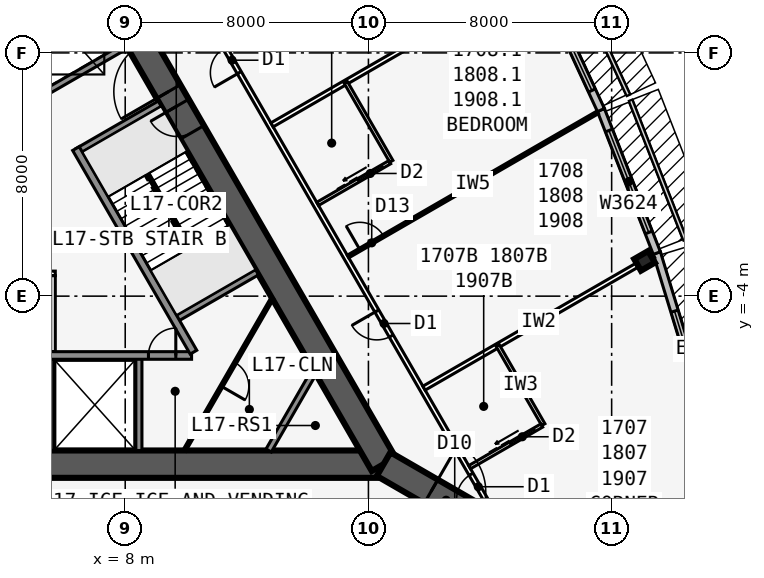
"""IFC4 building model, lengths in metres.
Left out: names, types, materials, properties, quantities, classifications, styles, units other than length and angle.
Written with IfcOpenShell. Run it as: python <this file> out.ifc"""

import sys

from ifc_helpers import new_model, si_unit, direction, frame, frame_2d, origin, origin_2d, place, context, subcontext, project, spatial, rectangle, i_section, extrude, element, fill, save


model = new_model("IFC4")
c1 = context("Model", 3, precision=1e-05, world=origin(), true_north=direction((0.0, 1.0)))
c2 = subcontext(c1, "Body", "Model", "MODEL_VIEW")
j1 = project(units=[si_unit("LENGTHUNIT", "METRE"), si_unit("PLANEANGLEUNIT", "RADIAN")], contexts=[c1])
p1 = place(None, origin())
s1 = spatial("IfcSite", under=j1, at=p1, CompositionType="ELEMENT")
p2 = place(p1, origin())
s2 = spatial("IfcBuilding", under=s1, at=p2, CompositionType="ELEMENT")
p3 = place(p2, frame((0.0, 0.0, 69.3)))
s3 = spatial("IfcBuildingStorey", under=s2, at=p3, CompositionType="ELEMENT", Elevation=69.3)
p4 = place(p3, frame((-16.5, -9.526, 0.0), z_axis=(0.0, 0.0, 1.0), x_axis=(1.0, 0.0, 0.0)))
e1 = element("IfcWall", 1, at=p4, inside=s3, PredefinedType="SHEAR", context=c2, shape_type="SweptSolid", body=[
    extrude(rectangle(XDim=33.0, YDim=0.9, at=frame_2d((16.5, 0.0))), origin(), (0.0, 0.0, 1.0), 3.4),
])
p5 = place(p4, frame((14.05, 0.0, 0.0)))
e2 = element("IfcOpeningElement", 2, at=p5, cuts=e1, PredefinedType="OPENING", context=c2, shape_type="SweptSolid", body=[
    extrude(rectangle(XDim=1.8, YDim=2.13, at=frame_2d((0.9, 1.065))), frame((0.0, 0.46, 0.0), z_axis=(0.0, -1.0, 0.0), x_axis=(1.0, 0.0, 0.0)), (0.0, 0.0, 1.0), 0.92),
])
p6 = place(p3, frame((-0.55, -5.951, 0.0), z_axis=(0.0, 0.0, 1.0), x_axis=(1.0, 0.0, 0.0)))
e3 = element("IfcWall", 3, at=p6, inside=s3, PredefinedType="SOLIDWALL", context=c2, shape_type="SweptSolid", body=[
    extrude(rectangle(XDim=10.733, YDim=0.25, at=frame_2d((5.366, 0.0))), origin(), (0.0, 0.0, 1.0), 3.235),
])
p7 = place(p6, frame((9.314, 0.0, 0.0)))
e4 = element("IfcOpeningElement", 4, at=p7, cuts=e3, PredefinedType="OPENING", context=c2, shape_type="SweptSolid", body=[
    extrude(rectangle(XDim=0.9, YDim=2.13, at=frame_2d((0.45, 1.065))), frame((0.0, 0.135, 0.0), z_axis=(0.0, -1.0, 0.0), x_axis=(1.0, 0.0, 0.0)), (0.0, 0.0, 1.0), 0.27),
])
p8 = place(p6, frame((1.05, 0.0, 0.0)))
e5 = element("IfcOpeningElement", 5, at=p8, cuts=e3, PredefinedType="OPENING", context=c2, shape_type="SweptSolid", body=[
    extrude(rectangle(XDim=1.1, YDim=2.13, at=frame_2d((0.55, 1.065))), frame((0.0, 0.135, 0.0), z_axis=(0.0, -1.0, 0.0), x_axis=(1.0, 0.0, 0.0)), (0.0, 0.0, 1.0), 0.27),
])
p9 = place(p6, frame((4.05, 0.0, 0.0)))
e6 = element("IfcOpeningElement", 6, at=p9, cuts=e3, PredefinedType="OPENING", context=c2, shape_type="SweptSolid", body=[
    extrude(rectangle(XDim=1.1, YDim=2.13, at=frame_2d((0.55, 1.065))), frame((0.0, 0.135, 0.0), z_axis=(0.0, -1.0, 0.0), x_axis=(1.0, 0.0, 0.0)), (0.0, 0.0, 1.0), 0.27),
])
for number, where, z_axis, x_axis in (
    (7, (5.55, -5.951, 0.0), (0.0, 0.0, 1.0), (0.0, -1.0, 0.0)),
    (8, (8.45, -5.951, 0.0), (0.0, 0.0, 1.0), (0.0, -1.0, 0.0)),
):
    element("IfcWall", number, at=place(p3, frame(where, z_axis=z_axis, x_axis=x_axis)), inside=s3, PredefinedType="SOLIDWALL", context=c2, shape_type="SweptSolid", body=[
        extrude(rectangle(XDim=3.125, YDim=0.2, at=frame_2d((1.562, 0.0))), origin(), (0.0, 0.0, 1.0), 3.235),
    ])
p10 = place(p3, frame((16.5, -9.526, 0.0), z_axis=(0.0, 0.0, 1.0), x_axis=(-0.499999749417, 0.866025548458, 0.0)))
e9 = element("IfcWall", 9, at=p10, inside=s3, PredefinedType="SHEAR", context=c2, shape_type="SweptSolid", body=[
    extrude(rectangle(XDim=33.0, YDim=0.9, at=frame_2d((16.5, 0.0))), origin(), (0.0, 0.0, 1.0), 3.4),
])
p11 = place(p10, frame((14.15, 0.0, 0.0)))
e10 = element("IfcOpeningElement", 10, at=p11, cuts=e9, PredefinedType="OPENING", context=c2, shape_type="SweptSolid", body=[
    extrude(rectangle(XDim=1.8, YDim=2.13, at=frame_2d((0.9, 1.065))), frame((0.0, 0.46, 0.0), z_axis=(0.0, -1.0, 0.0), x_axis=(1.0, 0.0, 0.0)), (0.0, 0.0, 1.0), 0.92),
])
p12 = place(p10, frame((12.6, 0.0, 0.0)))
e11 = element("IfcOpeningElement", 11, at=p12, cuts=e9, PredefinedType="OPENING", context=c2, shape_type="SweptSolid", body=[
    extrude(rectangle(XDim=1.0, YDim=2.13, at=frame_2d((0.5, 1.065))), frame((0.0, 0.46, 0.0), z_axis=(0.0, -1.0, 0.0), x_axis=(1.0, 0.0, 0.0)), (0.0, 0.0, 1.0), 0.92),
])
p13 = place(p3, frame((10.245, -5.843, 0.0), z_axis=(0.0, 0.0, 1.0), x_axis=(-0.499993009313, 0.866029439822, 0.0)))
e12 = element("IfcWall", 12, at=p13, inside=s3, PredefinedType="SOLIDWALL", context=c2, shape_type="SweptSolid", body=[
    extrude(rectangle(XDim=7.733, YDim=0.25, at=frame_2d((3.866, 0.0))), origin(), (0.0, 0.0, 1.0), 3.235),
])
for number, where, z_axis, x_axis in (
    (13, (9.629, -4.775, 0.0), (0.0, 0.0, 1.0), (0.866, 0.5, 0.0)),
    (14, (6.429, 0.767, 0.0), (0.0, 0.0, 1.0), (0.866, 0.5, 0.0)),
    (15, (5.329, 2.673, 0.0), (0.0, 0.0, 1.0), (0.866, 0.5, 0.0)),
):
    element("IfcWall", number, at=place(p3, frame(where, z_axis=z_axis, x_axis=x_axis)), inside=s3, PredefinedType="SOLIDWALL", context=c2, shape_type="SweptSolid", body=[
        extrude(rectangle(XDim=3.125, YDim=0.2, at=frame_2d((1.562, 0.0))), origin(), (0.0, 0.0, 1.0), 3.235),
    ])
p14 = place(p3, frame((16.5, -9.526, 0.0), z_axis=(0.0, 0.0, 1.0), x_axis=(0.866031398331, -0.499989616998, 0.0)))
e16 = element("IfcWall", 16, at=p14, inside=s3, PredefinedType="SHEAR", context=c2, shape_type="SweptSolid", body=[
    extrude(rectangle(XDim=4.746, YDim=0.9, at=frame_2d((2.373, 0.0))), origin(), (0.0, 0.0, 1.0), 3.4),
])
p15 = place(p14, frame((1.8, 0.0, 0.0)))
e17 = element("IfcOpeningElement", 17, at=p15, cuts=e16, PredefinedType="OPENING", context=c2, shape_type="SweptSolid", body=[
    extrude(rectangle(XDim=1.8, YDim=2.13, at=frame_2d((0.9, 1.065))), frame((0.0, 0.46, 0.0), z_axis=(0.0, -1.0, 0.0), x_axis=(1.0, 0.0, 0.0)), (0.0, 0.0, 1.0), 0.92),
])
p16 = place(p3, frame((25.083, -2.839, 0.0), z_axis=(0.0, 0.0, 1.0), x_axis=(-0.5, 0.866025403784, 0.0)))
e18 = element("IfcColumn", 18, at=p16, inside=s3, PredefinedType="COLUMN", context=c2, shape_type="SweptSolid", body=[
    extrude(i_section(OverallWidth=0.442, OverallDepth=0.531, WebThickness=0.066, FlangeThickness=0.106, at=origin_2d()), origin(), (0.0, 0.0, 1.0), 3.4),
])
p17 = place(p3, frame((27.88, -10.429, 0.0), z_axis=(0.0, 0.0, 1.0), x_axis=(-0.2919790669, 0.956424709265, 0.0)))
e19 = element("IfcWall", 19, at=p17, inside=s3, PredefinedType="STANDARD", context=c2, shape_type="SweptSolid", body=[
    extrude(rectangle(XDim=8.211, YDim=0.25, at=frame_2d((4.105, 0.0))), origin(), (0.0, 0.0, 1.0), 3.235),
])
p18 = place(p17, frame((2.006, 0.0, 0.45)))
e20 = element("IfcOpeningElement", 20, at=p18, cuts=e19, PredefinedType="OPENING", context=c2, shape_type="SweptSolid", body=[
    extrude(rectangle(XDim=4.2, YDim=2.4, at=frame_2d((2.1, 1.2))), frame((0.0, 0.135, 0.0), z_axis=(0.0, -1.0, 0.0), x_axis=(1.0, 0.0, 0.0)), (0.0, 0.0, 1.0), 0.27),
])
p19 = place(p3, frame((25.486, -2.584, 0.0), z_axis=(0.0, 0.0, 1.0), x_axis=(-0.364013463868, 0.931393685894, 0.0)))
e21 = element("IfcWall", 21, at=p19, inside=s3, PredefinedType="STANDARD", context=c2, shape_type="SweptSolid", body=[
    extrude(rectangle(XDim=5.058, YDim=0.25, at=frame_2d((2.529, 0.0))), origin(), (0.0, 0.0, 1.0), 3.235),
])
p20 = place(p19, frame((0.729, 0.0, 0.45)))
e22 = element("IfcOpeningElement", 22, at=p20, cuts=e21, PredefinedType="OPENING", context=c2, shape_type="SweptSolid", body=[
    extrude(rectangle(XDim=3.6, YDim=2.4, at=frame_2d((1.8, 1.2))), frame((0.0, 0.135, 0.0), z_axis=(0.0, -1.0, 0.0), x_axis=(1.0, 0.0, 0.0)), (0.0, 0.0, 1.0), 0.27),
])
p21 = place(p3, frame((23.648, 2.119, 0.0), z_axis=(0.0, 0.0, 1.0), x_axis=(-0.419203100754, 0.907892482796, 0.0)))
e23 = element("IfcWall", 23, at=p21, inside=s3, PredefinedType="STANDARD", context=c2, shape_type="SweptSolid", body=[
    extrude(rectangle(XDim=5.021, YDim=0.25, at=frame_2d((2.51, 0.0))), origin(), (0.0, 0.0, 1.0), 3.235),
])
p22 = place(p21, frame((0.71, 0.0, 0.45)))
e24 = element("IfcOpeningElement", 24, at=p22, cuts=e23, PredefinedType="OPENING", context=c2, shape_type="SweptSolid", body=[
    extrude(rectangle(XDim=3.6, YDim=2.4, at=frame_2d((1.8, 1.2))), frame((0.0, 0.135, 0.0), z_axis=(0.0, -1.0, 0.0), x_axis=(1.0, 0.0, 0.0)), (0.0, 0.0, 1.0), 0.27),
])
p23 = place(p3, frame((20.027, -10.985, 0.0), z_axis=(0.0, 0.0, 1.0), x_axis=(-0.500001677587, 0.866024435227, 0.0)))
e25 = element("IfcWall", 25, at=p23, inside=s3, PredefinedType="PARTITIONING", context=c2, shape_type="SweptSolid", body=[
    extrude(rectangle(XDim=39.054, YDim=0.15, at=frame_2d((19.527, 0.0))), origin(), (0.0, 0.0, 1.0), 3.235),
])
p24 = place(p23, frame((0.352, 0.0, 0.0)))
e26 = element("IfcOpeningElement", 26, at=p24, cuts=e25, PredefinedType="OPENING", context=c2, shape_type="SweptSolid", body=[
    extrude(rectangle(XDim=0.95, YDim=2.13, at=frame_2d((0.475, 1.065))), frame((0.0, 0.085, 0.0), z_axis=(0.0, -1.0, 0.0), x_axis=(1.0, 0.0, 0.0)), (0.0, 0.0, 1.0), 0.17),
])
p25 = place(p23, frame((6.552, 0.0, 0.0)))
e27 = element("IfcOpeningElement", 27, at=p25, cuts=e25, PredefinedType="OPENING", context=c2, shape_type="SweptSolid", body=[
    extrude(rectangle(XDim=0.95, YDim=2.13, at=frame_2d((0.475, 1.065))), frame((0.0, 0.085, 0.0), z_axis=(0.0, -1.0, 0.0), x_axis=(1.0, 0.0, 0.0)), (0.0, 0.0, 1.0), 0.17),
])
p26 = place(p23, frame((16.552, 0.0, 0.0)))
e28 = element("IfcOpeningElement", 28, at=p26, cuts=e25, PredefinedType="OPENING", context=c2, shape_type="SweptSolid", body=[
    extrude(rectangle(XDim=0.95, YDim=2.13, at=frame_2d((0.475, 1.065))), frame((0.0, 0.085, 0.0), z_axis=(0.0, -1.0, 0.0), x_axis=(1.0, 0.0, 0.0)), (0.0, 0.0, 1.0), 0.17),
])
p27 = place(p23, frame((25.952, 0.0, 0.0)))
e29 = element("IfcOpeningElement", 29, at=p27, cuts=e25, PredefinedType="OPENING", context=c2, shape_type="SweptSolid", body=[
    extrude(rectangle(XDim=0.95, YDim=2.13, at=frame_2d((0.475, 1.065))), frame((0.0, 0.085, 0.0), z_axis=(0.0, -1.0, 0.0), x_axis=(1.0, 0.0, 0.0)), (0.0, 0.0, 1.0), 0.17),
])
p28 = place(p23, frame((36.546, 0.0, 0.0)))
e30 = element("IfcOpeningElement", 30, at=p28, cuts=e25, PredefinedType="OPENING", context=c2, shape_type="SweptSolid", body=[
    extrude(rectangle(XDim=0.95, YDim=2.13, at=frame_2d((0.475, 1.065))), frame((0.0, 0.085, 0.0), z_axis=(0.0, -1.0, 0.0), x_axis=(1.0, 0.0, 0.0)), (0.0, 0.0, 1.0), 0.17),
])
p29 = place(p3, frame((17.829, -7.027, 0.0), z_axis=(0.0, 0.0, 1.0), x_axis=(0.866032659912, 0.499987431809, 0.0)))
e31 = element("IfcWall", 31, at=p29, inside=s3, PredefinedType="PARTITIONING", context=c2, shape_type="SweptSolid", body=[
    extrude(rectangle(XDim=8.72, YDim=0.15, at=frame_2d((4.36, 0.0))), origin(), (0.0, 0.0, 1.0), 2.389),
])
p30 = place(p3, frame((15.329, -2.697, 0.0), z_axis=(0.0, 0.0, 1.0), x_axis=(0.866018409083, 0.500012114982, 0.0)))
e32 = element("IfcWall", 32, at=p30, inside=s3, PredefinedType="PARTITIONING", context=c2, shape_type="SweptSolid", body=[
    extrude(rectangle(XDim=9.485, YDim=0.1, at=frame_2d((4.742, 0.0))), origin(), (0.0, 0.0, 1.0), 2.389),
])
p31 = place(p30, frame((0.45, 0.0, 0.0)))
e33 = element("IfcOpeningElement", 33, at=p31, cuts=e32, PredefinedType="OPENING", context=c2, shape_type="SweptSolid", body=[
    extrude(rectangle(XDim=0.9, YDim=2.13, at=frame_2d((0.45, 1.065))), frame((0.0, 0.06, 0.0), z_axis=(0.0, -1.0, 0.0), x_axis=(1.0, 0.0, 0.0)), (0.0, 0.0, 1.0), 0.12),
])
p32 = place(p3, frame((12.829, 1.633, 0.0), z_axis=(0.0, 0.0, 1.0), x_axis=(0.866026934769, 0.499997348248, 0.0)))
e34 = element("IfcWall", 34, at=p32, inside=s3, PredefinedType="PARTITIONING", context=c2, shape_type="SweptSolid", body=[
    extrude(rectangle(XDim=9.943, YDim=0.15, at=frame_2d((4.971, 0.0))), origin(), (0.0, 0.0, 1.0), 2.389),
])
p33 = place(p3, frame((21.753, -8.225, 0.0), z_axis=(0.0, 0.0, 1.0), x_axis=(-0.499990139034, 0.866031096941, 0.0)))
e35 = element("IfcWall", 35, at=p33, inside=s3, PredefinedType="PLUMBINGWALL", context=c2, shape_type="SweptSolid", body=[
    extrude(rectangle(XDim=3.0, YDim=0.12, at=frame_2d((1.5, 0.0))), origin(), (0.0, 0.0, 1.0), 3.235),
])
p34 = place(p3, frame((19.329, -9.625, 0.0), z_axis=(0.0, 0.0, 1.0), x_axis=(0.866035715982, 0.499982138324, 0.0)))
e36 = element("IfcWall", 36, at=p34, inside=s3, PredefinedType="PLUMBINGWALL", context=c2, shape_type="SweptSolid", body=[
    extrude(rectangle(XDim=2.74, YDim=0.12, at=frame_2d((1.37, 0.0))), origin(), (0.0, 0.0, 1.0), 3.235),
])
p35 = place(p34, frame((1.55, 0.0, 0.0)))
e37 = element("IfcOpeningElement", 37, at=p35, cuts=e36, PredefinedType="OPENING", context=c2, shape_type="SweptSolid", body=[
    extrude(rectangle(XDim=0.9, YDim=2.13, at=frame_2d((0.45, 1.065))), frame((0.0, 0.07, 0.0), z_axis=(0.0, -1.0, 0.0), x_axis=(1.0, 0.0, 0.0)), (0.0, 0.0, 1.0), 0.14),
])
p36 = place(p3, frame((16.753, 0.435, 0.0), z_axis=(0.0, 0.0, 1.0), x_axis=(-0.499990139034, 0.866031096941, 0.0)))
e38 = element("IfcWall", 38, at=p36, inside=s3, PredefinedType="PLUMBINGWALL", context=c2, shape_type="SweptSolid", body=[
    extrude(rectangle(XDim=3.0, YDim=0.12, at=frame_2d((1.5, 0.0))), origin(), (0.0, 0.0, 1.0), 3.235),
])
p37 = place(p3, frame((14.329, -0.965, 0.0), z_axis=(0.0, 0.0, 1.0), x_axis=(0.866035715982, 0.499982138324, 0.0)))
e39 = element("IfcWall", 39, at=p37, inside=s3, PredefinedType="PLUMBINGWALL", context=c2, shape_type="SweptSolid", body=[
    extrude(rectangle(XDim=2.74, YDim=0.12, at=frame_2d((1.37, 0.0))), origin(), (0.0, 0.0, 1.0), 3.235),
])
p38 = place(p37, frame((1.55, 0.0, 0.0)))
e40 = element("IfcOpeningElement", 40, at=p38, cuts=e39, PredefinedType="OPENING", context=c2, shape_type="SweptSolid", body=[
    extrude(rectangle(XDim=0.9, YDim=2.13, at=frame_2d((0.45, 1.065))), frame((0.0, 0.07, 0.0), z_axis=(0.0, -1.0, 0.0), x_axis=(1.0, 0.0, 0.0)), (0.0, 0.0, 1.0), 0.14),
])
p39 = place(p3, frame((-2.65, -3.251, 0.0), z_axis=(0.0, 0.0, 1.0), x_axis=(1.0, 0.0, 0.0)))
e41 = element("IfcWall", 41, at=p39, inside=s3, PredefinedType="PARTITIONING", context=c2, shape_type="SweptSolid", body=[
    extrude(rectangle(XDim=8.35, YDim=0.15, at=frame_2d((4.175, 0.0))), origin(), (0.0, 0.0, 1.0), 3.235),
])
p40 = place(p3, frame((5.625, -5.826, 0.0), z_axis=(0.0, 0.0, 1.0), x_axis=(0.0, 1.0, 0.0)))
e42 = element("IfcWall", 42, at=p40, inside=s3, PredefinedType="PARTITIONING", context=c2, shape_type="SweptSolid", body=[
    extrude(rectangle(XDim=2.5, YDim=0.15, at=frame_2d((1.25, 0.0))), origin(), (0.0, 0.0, 1.0), 3.235),
])
p41 = place(p3, frame((14.219, -6.476, 0.0), z_axis=(0.0, 0.0, 1.0), x_axis=(-0.499952404951, -0.866052881055, 0.0)))
e43 = element("IfcWall", 43, at=p41, inside=s3, PredefinedType="SOLIDWALL", context=c2, shape_type="SweptSolid", body=[
    extrude(rectangle(XDim=3.002, YDim=0.2, at=frame_2d((1.501, 0.0))), origin(), (0.0, 0.0, 1.0), 3.235),
])
p42 = place(p3, frame((12.834, -4.076, 0.0), z_axis=(0.0, 0.0, 1.0), x_axis=(-0.500027479704, -0.866009537788, 0.0)))
e44 = element("IfcWall", 44, at=p42, inside=s3, PredefinedType="PARTITIONING", context=c2, shape_type="SweptSolid", body=[
    extrude(rectangle(XDim=5.774, YDim=0.1, at=frame_2d((2.887, 0.0))), origin(), (0.0, 0.0, 1.0), 3.235),
])
p43 = place(p42, frame((2.437, 0.0, 0.0)))
e45 = element("IfcOpeningElement", 45, at=p43, cuts=e44, PredefinedType="OPENING", context=c2, shape_type="SweptSolid", body=[
    extrude(rectangle(XDim=0.9, YDim=2.13, at=frame_2d((0.45, 1.065))), frame((0.0, 0.06, 0.0), z_axis=(0.0, -1.0, 0.0), x_axis=(1.0, 0.0, 0.0)), (0.0, 0.0, 1.0), 0.12),
])
p44 = place(p3, frame((10.135, -2.401, 0.0), z_axis=(0.0, 0.0, 1.0), x_axis=(-0.499992232847, 0.866029888106, 0.0)))
e46 = element("IfcWall", 46, at=p44, inside=s3, PredefinedType="SOLIDWALL", context=c2, shape_type="SweptSolid", body=[
    extrude(rectangle(XDim=2.794, YDim=0.1, at=frame_2d((1.397, 0.0))), origin(), (0.0, 0.0, 1.0), 3.4),
])
p45 = place(p18, origin())
e47 = element("IfcWindow", 47, at=p45, inside=s3, PartitioningType="SINGLE_PANEL", PredefinedType="WINDOW", context=c2, shape_type="SweptSolid", body=[
    extrude(rectangle(XDim=4.2, YDim=2.4, at=frame_2d((2.1, 1.2))), frame((0.0, 0.03, 0.0), z_axis=(0.0, -1.0, 0.0), x_axis=(1.0, 0.0, 0.0)), (0.0, 0.0, 1.0), 0.06),
])
fill(e20, e47)
p46 = place(p20, origin())
e48 = element("IfcWindow", 48, at=p46, inside=s3, PartitioningType="SINGLE_PANEL", PredefinedType="WINDOW", context=c2, shape_type="SweptSolid", body=[
    extrude(rectangle(XDim=3.6, YDim=2.4, at=frame_2d((1.8, 1.2))), frame((0.0, 0.03, 0.0), z_axis=(0.0, -1.0, 0.0), x_axis=(1.0, 0.0, 0.0)), (0.0, 0.0, 1.0), 0.06),
])
fill(e22, e48)
p47 = place(p22, origin())
e49 = element("IfcWindow", 49, at=p47, inside=s3, PartitioningType="SINGLE_PANEL", PredefinedType="WINDOW", context=c2, shape_type="SweptSolid", body=[
    extrude(rectangle(XDim=3.6, YDim=2.4, at=frame_2d((1.8, 1.2))), frame((0.0, 0.03, 0.0), z_axis=(0.0, -1.0, 0.0), x_axis=(1.0, 0.0, 0.0)), (0.0, 0.0, 1.0), 0.06),
])
fill(e24, e49)
p48 = place(p31, origin())
e50 = element("IfcDoor", 50, at=p48, inside=s3, OperationType="SINGLE_SWING_LEFT", PredefinedType="DOOR", context=c2, shape_type="SweptSolid", body=[
    extrude(rectangle(XDim=0.9, YDim=2.13, at=frame_2d((0.45, 1.065))), frame((0.0, 0.025, 0.0), z_axis=(0.0, -1.0, 0.0), x_axis=(1.0, 0.0, 0.0)), (0.0, 0.0, 1.0), 0.05),
])
fill(e33, e50)
p49 = place(p35, origin())
e51 = element("IfcDoor", 51, at=p49, inside=s3, OperationType="SLIDING_TO_LEFT", PredefinedType="DOOR", context=c2, shape_type="SweptSolid", body=[
    extrude(rectangle(XDim=0.9, YDim=2.13, at=frame_2d((0.45, 1.065))), frame((0.0, 0.025, 0.0), z_axis=(0.0, -1.0, 0.0), x_axis=(1.0, 0.0, 0.0)), (0.0, 0.0, 1.0), 0.05),
])
fill(e37, e51)
p50 = place(p24, origin())
e52 = element("IfcDoor", 52, at=p50, inside=s3, OperationType="SINGLE_SWING_LEFT", PredefinedType="DOOR", context=c2, shape_type="SweptSolid", body=[
    extrude(rectangle(XDim=0.95, YDim=2.13, at=frame_2d((0.475, 1.065))), frame((0.0, 0.025, 0.0), z_axis=(0.0, -1.0, 0.0), x_axis=(1.0, 0.0, 0.0)), (0.0, 0.0, 1.0), 0.05),
])
fill(e26, e52)
p51 = place(p25, origin())
e53 = element("IfcDoor", 53, at=p51, inside=s3, OperationType="SINGLE_SWING_RIGHT", PredefinedType="DOOR", context=c2, shape_type="SweptSolid", body=[
    extrude(rectangle(XDim=0.95, YDim=2.13, at=frame_2d((0.475, 1.065))), frame((0.0, 0.025, 0.0), z_axis=(0.0, -1.0, 0.0), x_axis=(1.0, 0.0, 0.0)), (0.0, 0.0, 1.0), 0.05),
])
fill(e27, e53)
p52 = place(p38, origin())
e54 = element("IfcDoor", 54, at=p52, inside=s3, OperationType="SLIDING_TO_LEFT", PredefinedType="DOOR", context=c2, shape_type="SweptSolid", body=[
    extrude(rectangle(XDim=0.9, YDim=2.13, at=frame_2d((0.45, 1.065))), frame((0.0, 0.025, 0.0), z_axis=(0.0, -1.0, 0.0), x_axis=(1.0, 0.0, 0.0)), (0.0, 0.0, 1.0), 0.05),
])
fill(e40, e54)
p53 = place(p26, origin())
e55 = element("IfcDoor", 55, at=p53, inside=s3, OperationType="SINGLE_SWING_LEFT", PredefinedType="DOOR", context=c2, shape_type="SweptSolid", body=[
    extrude(rectangle(XDim=0.95, YDim=2.13, at=frame_2d((0.475, 1.065))), frame((0.0, 0.025, 0.0), z_axis=(0.0, -1.0, 0.0), x_axis=(1.0, 0.0, 0.0)), (0.0, 0.0, 1.0), 0.05),
])
fill(e28, e55)
p54 = place(p11, origin())
e56 = element("IfcDoor", 56, at=p54, inside=s3, OperationType="DOUBLE_DOOR_SINGLE_SWING", PredefinedType="DOOR", context=c2, shape_type="SweptSolid", body=[
    extrude(rectangle(XDim=1.8, YDim=2.13, at=frame_2d((0.9, 1.065))), frame((0.0, 0.025, 0.0), z_axis=(0.0, -1.0, 0.0), x_axis=(1.0, 0.0, 0.0)), (0.0, 0.0, 1.0), 0.05),
])
fill(e10, e56)
p55 = place(p12, origin())
e57 = element("IfcDoor", 57, at=p55, inside=s3, OperationType="SINGLE_SWING_RIGHT", PredefinedType="DOOR", context=c2, shape_type="SweptSolid", body=[
    extrude(rectangle(XDim=1.0, YDim=2.13, at=frame_2d((0.5, 1.065))), frame((0.0, 0.025, 0.0), z_axis=(0.0, -1.0, 0.0), x_axis=(1.0, 0.0, 0.0)), (0.0, 0.0, 1.0), 0.05),
])
fill(e11, e57)
p56 = place(p15, origin())
e58 = element("IfcDoor", 58, at=p56, inside=s3, OperationType="DOUBLE_DOOR_DOUBLE_SWING", PredefinedType="DOOR", context=c2, shape_type="SweptSolid", body=[
    extrude(rectangle(XDim=1.8, YDim=2.13, at=frame_2d((0.9, 1.065))), frame((0.0, 0.025, 0.0), z_axis=(0.0, -1.0, 0.0), x_axis=(1.0, 0.0, 0.0)), (0.0, 0.0, 1.0), 0.05),
])
fill(e17, e58)
p57 = place(p43, origin())
e59 = element("IfcDoor", 59, at=p57, inside=s3, OperationType="SINGLE_SWING_RIGHT", PredefinedType="DOOR", context=c2, shape_type="SweptSolid", body=[
    extrude(rectangle(XDim=0.9, YDim=2.13, at=frame_2d((0.45, 1.065))), frame((0.0, 0.025, 0.0), z_axis=(0.0, -1.0, 0.0), x_axis=(1.0, 0.0, 0.0)), (0.0, 0.0, 1.0), 0.05),
])
fill(e45, e59)
p58 = place(p7, origin())
e60 = element("IfcDoor", 60, at=p58, inside=s3, OperationType="SINGLE_SWING_RIGHT", PredefinedType="DOOR", context=c2, shape_type="SweptSolid", body=[
    extrude(rectangle(XDim=0.9, YDim=2.13, at=frame_2d((0.45, 1.065))), frame((0.0, 0.025, 0.0), z_axis=(0.0, -1.0, 0.0), x_axis=(1.0, 0.0, 0.0)), (0.0, 0.0, 1.0), 0.05),
])
fill(e4, e60)
save(model, sys.argv[1])
